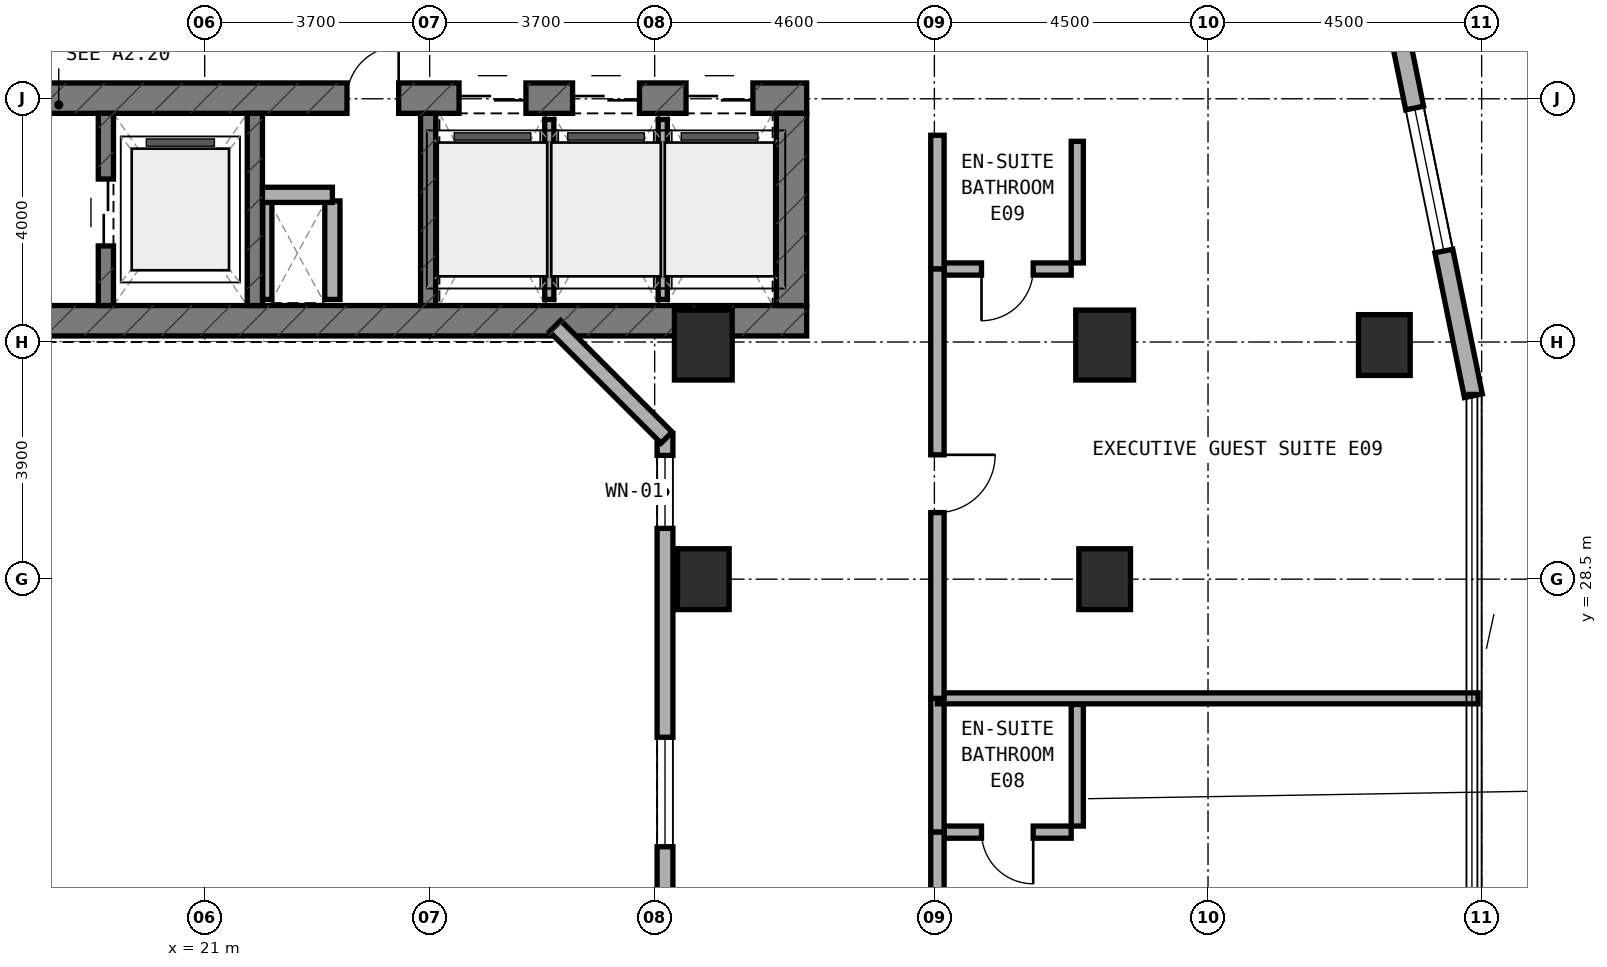
"""IFC4 building model, lengths in metres.
Left out: names, types, materials, properties, quantities, classifications, styles, units other than length and angle.
Written with IfcOpenShell. Run it as: python <this file> out.ifc"""

import sys

from ifc_helpers import new_model, si_unit, direction, frame, frame_2d, origin, origin_2d, place, context, subcontext, project, spatial, rectangle, extrude, element, fill, save


model = new_model("IFC4")
c1 = context("Model", 3, precision=1e-05, world=origin(), true_north=direction((0.0, 1.0)))
c2 = subcontext(c1, "Body", "Model", "MODEL_VIEW")
j1 = project(units=[si_unit("LENGTHUNIT", "METRE"), si_unit("PLANEANGLEUNIT", "RADIAN")], contexts=[c1])
p1 = place(None, origin())
s1 = spatial("IfcSite", under=j1, at=p1, CompositionType="ELEMENT")
p2 = place(p1, origin())
s2 = spatial("IfcBuilding", under=s1, at=p2, CompositionType="ELEMENT")
p3 = place(p2, frame((0.0, 0.0, 83.5)))
s3 = spatial("IfcBuildingStorey", under=s2, at=p3, CompositionType="ELEMENT", Elevation=83.5)
p4 = place(p3, frame((6.3, 32.75, 0.0), z_axis=(0.0, 0.0, 1.0), x_axis=(1.0, 0.0, 0.0)))
e1 = element("IfcWall", 1, at=p4, inside=s3, PredefinedType="SHEAR", context=c2, shape_type="SweptSolid", body=[
    extrude(rectangle(XDim=24.6, YDim=0.5, at=frame_2d((12.3, 0.0))), origin(), (0.0, 0.0, 1.0), 3.5),
])
p5 = place(p4, frame((6.15, 0.0, 0.0)))
e2 = element("IfcOpeningElement", 2, at=p5, cuts=e1, PredefinedType="OPENING", context=c2, shape_type="SweptSolid", body=[
    extrude(rectangle(XDim=1.1, YDim=2.15, at=frame_2d((0.55, 1.075))), frame((0.0, 0.26, 0.0), z_axis=(0.0, -1.0, 0.0), x_axis=(1.0, 0.0, 0.0)), (0.0, 0.0, 1.0), 0.52),
])
p6 = place(p3, frame((6.3, 36.41, 0.0), z_axis=(0.0, 0.0, 1.0), x_axis=(1.0, 0.0, 0.0)))
e3 = element("IfcWall", 3, at=p6, inside=s3, PredefinedType="SHEAR", context=c2, shape_type="SweptSolid", body=[
    extrude(rectangle(XDim=24.6, YDim=0.5, at=frame_2d((12.3, 0.0))), origin(), (0.0, 0.0, 1.0), 3.5),
])
p7 = place(p6, frame((9.25, 0.0, 0.0)))
e4 = element("IfcOpeningElement", 4, at=p7, cuts=e3, PredefinedType="OPENING", context=c2, shape_type="SweptSolid", body=[
    extrude(rectangle(XDim=1.2, YDim=2.15, at=frame_2d((0.6, 1.075))), frame((0.0, 0.26, 0.0), z_axis=(0.0, -1.0, 0.0), x_axis=(1.0, 0.0, 0.0)), (0.0, 0.0, 1.0), 0.52),
])
p8 = place(p6, frame((17.04, 0.0, 0.0)))
e5 = element("IfcOpeningElement", 5, at=p8, cuts=e3, PredefinedType="OPENING", context=c2, shape_type="SweptSolid", body=[
    extrude(rectangle(XDim=0.85, YDim=2.1, at=frame_2d((0.425, 1.05))), frame((0.0, 0.26, 0.0), z_axis=(0.0, -1.0, 0.0), x_axis=(1.0, 0.0, 0.0)), (0.0, 0.0, 1.0), 0.52),
])
p9 = place(p6, frame((18.883, 0.0, 0.0)))
e6 = element("IfcOpeningElement", 6, at=p9, cuts=e3, PredefinedType="OPENING", context=c2, shape_type="SweptSolid", body=[
    extrude(rectangle(XDim=1.1, YDim=2.15, at=frame_2d((0.55, 1.075))), frame((0.0, 0.26, 0.0), z_axis=(0.0, -1.0, 0.0), x_axis=(1.0, 0.0, 0.0)), (0.0, 0.0, 1.0), 0.52),
])
p10 = place(p6, frame((20.75, 0.0, 0.0)))
e7 = element("IfcOpeningElement", 7, at=p10, cuts=e3, PredefinedType="OPENING", context=c2, shape_type="SweptSolid", body=[
    extrude(rectangle(XDim=1.1, YDim=2.15, at=frame_2d((0.55, 1.075))), frame((0.0, 0.26, 0.0), z_axis=(0.0, -1.0, 0.0), x_axis=(1.0, 0.0, 0.0)), (0.0, 0.0, 1.0), 0.52),
])
p11 = place(p6, frame((22.616, 0.0, 0.0)))
e8 = element("IfcOpeningElement", 8, at=p11, cuts=e3, PredefinedType="OPENING", context=c2, shape_type="SweptSolid", body=[
    extrude(rectangle(XDim=1.1, YDim=2.15, at=frame_2d((0.55, 1.075))), frame((0.0, 0.26, 0.0), z_axis=(0.0, -1.0, 0.0), x_axis=(1.0, 0.0, 0.0)), (0.0, 0.0, 1.0), 0.52),
])
p12 = place(p3, frame((30.65, 33.0, 0.0), z_axis=(0.0, 0.0, 1.0), x_axis=(0.0, 1.0, 0.0)))
e9 = element("IfcWall", 9, at=p12, inside=s3, PredefinedType="SHEAR", context=c2, shape_type="SweptSolid", body=[
    extrude(rectangle(XDim=3.16, YDim=0.5, at=frame_2d((1.58, 0.0))), origin(), (0.0, 0.0, 1.0), 3.5),
])
p13 = place(p3, frame((19.375, 33.0, 0.0), z_axis=(0.0, 0.0, 1.0), x_axis=(0.0, 1.0, 0.0)))
e10 = element("IfcWall", 10, at=p13, inside=s3, PredefinedType="STANDARD", context=c2, shape_type="SweptSolid", body=[
    extrude(rectangle(XDim=3.16, YDim=0.25, at=frame_2d((1.58, 0.0))), origin(), (0.0, 0.0, 1.0), 3.22),
])
p14 = place(p13, frame((0.98, 0.0, 0.0)))
e11 = element("IfcOpeningElement", 11, at=p14, cuts=e10, PredefinedType="OPENING", context=c2, shape_type="SweptSolid", body=[
    extrude(rectangle(XDim=1.1, YDim=2.15, at=frame_2d((0.55, 1.075))), frame((0.0, 0.135, 0.0), z_axis=(0.0, -1.0, 0.0), x_axis=(1.0, 0.0, 0.0)), (0.0, 0.0, 1.0), 0.27),
])
for number, where, z_axis, x_axis in (
    (12, (21.825, 33.0, 0.0), (0.0, 0.0, 1.0), (0.0, 1.0, 0.0)),
    (13, (24.675, 33.0, 0.0), (0.0, 0.0, 1.0), (0.0, 1.0, 0.0)),
):
    element("IfcWall", number, at=place(p3, frame(where, z_axis=z_axis, x_axis=x_axis)), inside=s3, PredefinedType="STANDARD", context=c2, shape_type="SweptSolid", body=[
        extrude(rectangle(XDim=3.16, YDim=0.25, at=frame_2d((1.58, 0.0))), origin(), (0.0, 0.0, 1.0), 3.22),
    ])
p15 = place(p3, frame((35.8, 28.5, 0.0), z_axis=(0.0, 0.0, 1.0), x_axis=(1.0, 0.0, 0.0)))
e14 = element("IfcColumn", 14, at=p15, inside=s3, PredefinedType="COLUMN", context=c2, shape_type="SweptSolid", body=[
    extrude(rectangle(XDim=0.85, YDim=1.0, at=origin_2d()), origin(), (0.0, 0.0, 1.0), 3.5),
])
for number, where, z_axis, x_axis in (
    (15, (35.8, 32.35, 0.0), (0.0, 0.0, 1.0), (1.0, 0.0, 0.0)),
    (16, (29.2, 32.35, 0.0), (0.0, 0.0, 1.0), (1.0, 0.0, 0.0)),
):
    element("IfcColumn", number, at=place(p3, frame(where, z_axis=z_axis, x_axis=x_axis)), inside=s3, PredefinedType="COLUMN", context=c2, shape_type="SweptSolid", body=[
        extrude(rectangle(XDim=0.95, YDim=1.15, at=origin_2d()), origin(), (0.0, 0.0, 1.0), 3.5),
    ])
for number, where, z_axis, x_axis in (
    (17, (29.2, 28.5, 0.0), (0.0, 0.0, 1.0), (1.0, 0.0, 0.0)),
    (18, (40.4, 32.35, 0.0), (0.0, 0.0, 1.0), (1.0, 0.0, 0.0)),
):
    element("IfcColumn", number, at=place(p3, frame(where, z_axis=z_axis, x_axis=x_axis)), inside=s3, PredefinedType="COLUMN", context=c2, shape_type="SweptSolid", body=[
        extrude(rectangle(XDim=0.85, YDim=1.0, at=origin_2d()), origin(), (0.0, 0.0, 1.0), 3.5),
    ])
p16 = place(p3, frame((41.864, 31.516, 0.0), z_axis=(0.0, 0.0, 1.0), x_axis=(-0.199990901713, 0.979797754249, 0.0)))
e19 = element("IfcWall", 19, at=p16, inside=s3, PredefinedType="STANDARD", context=c2, shape_type="SweptSolid", body=[
    extrude(rectangle(XDim=10.065, YDim=0.3, at=frame_2d((5.033, 0.0))), origin(), (0.0, 0.0, 1.0), 3.22),
])
p17 = place(p16, frame((2.429, 0.0, 0.8)))
e20 = element("IfcOpeningElement", 20, at=p17, cuts=e19, PredefinedType="OPENING", context=c2, shape_type="SweptSolid", body=[
    extrude(rectangle(XDim=2.4, YDim=1.6, at=frame_2d((1.2, 0.8))), frame((0.0, 0.16, 0.0), z_axis=(0.0, -1.0, 0.0), x_axis=(1.0, 0.0, 0.0)), (0.0, 0.0, 1.0), 0.32),
])
p18 = place(p16, frame((7.887, 0.0, 0.85)))
e21 = element("IfcOpeningElement", 21, at=p18, cuts=e19, PredefinedType="OPENING", context=c2, shape_type="SweptSolid", body=[
    extrude(rectangle(XDim=1.8, YDim=1.5, at=frame_2d((0.9, 0.75))), frame((0.0, 0.16, 0.0), z_axis=(0.0, -1.0, 0.0), x_axis=(1.0, 0.0, 0.0)), (0.0, 0.0, 1.0), 0.32),
])
p19 = place(p3, frame((28.57, 19.11, 0.0), z_axis=(0.0, 0.0, 1.0), x_axis=(0.0, 1.0, 0.0)))
e22 = element("IfcWall", 22, at=p19, inside=s3, PredefinedType="STANDARD", context=c2, shape_type="SweptSolid", body=[
    extrude(rectangle(XDim=11.78, YDim=0.26, at=frame_2d((5.89, 0.0))), origin(), (0.0, 0.0, 1.0), 3.22),
])
p20 = place(p19, frame((0.355, 0.0, 0.85)))
e23 = element("IfcOpeningElement", 23, at=p20, cuts=e22, PredefinedType="OPENING", context=c2, shape_type="SweptSolid", body=[
    extrude(rectangle(XDim=1.2, YDim=1.5, at=frame_2d((0.6, 0.75))), frame((0.0, 0.14, 0.0), z_axis=(0.0, -1.0, 0.0), x_axis=(1.0, 0.0, 0.0)), (0.0, 0.0, 1.0), 0.28),
])
p21 = place(p19, frame((4.99, 0.0, 0.85)))
e24 = element("IfcOpeningElement", 24, at=p21, cuts=e22, PredefinedType="OPENING", context=c2, shape_type="SweptSolid", body=[
    extrude(rectangle(XDim=1.8, YDim=1.5, at=frame_2d((0.9, 0.75))), frame((0.0, 0.14, 0.0), z_axis=(0.0, -1.0, 0.0), x_axis=(1.0, 0.0, 0.0)), (0.0, 0.0, 1.0), 0.28),
])
p22 = place(p19, frame((10.225, 0.0, 0.85)))
e25 = element("IfcOpeningElement", 25, at=p22, cuts=e22, PredefinedType="OPENING", context=c2, shape_type="SweptSolid", body=[
    extrude(rectangle(XDim=1.2, YDim=1.5, at=frame_2d((0.6, 0.75))), frame((0.0, 0.14, 0.0), z_axis=(0.0, -1.0, 0.0), x_axis=(1.0, 0.0, 0.0)), (0.0, 0.0, 1.0), 0.28),
])
p23 = place(p3, frame((28.596, 30.828, 0.0), z_axis=(0.0, 0.0, 1.0), x_axis=(-0.707059717605, 0.707153841636, 0.0)))
e26 = element("IfcWall", 26, at=p23, inside=s3, PredefinedType="STANDARD", context=c2, shape_type="SweptSolid", body=[
    extrude(rectangle(XDim=2.594, YDim=0.26, at=frame_2d((1.297, 0.0))), origin(), (0.0, 0.0, 1.0), 3.22),
])
p24 = place(p3, frame((22.03, 33.1, 0.0), z_axis=(0.0, 0.0, 1.0), x_axis=(0.0, 1.0, 0.0)))
e27 = element("IfcWall", 27, at=p24, inside=s3, PredefinedType="PARTITIONING", context=c2, shape_type="SweptSolid", body=[
    extrude(rectangle(XDim=1.62, YDim=0.15, at=frame_2d((0.81, 0.0))), origin(), (0.0, 0.0, 1.0), 3.22),
])
p25 = place(p3, frame((23.1, 33.1, 0.0), z_axis=(0.0, 0.0, 1.0), x_axis=(0.0, 1.0, 0.0)))
e28 = element("IfcWall", 28, at=p25, inside=s3, PredefinedType="SOLIDWALL", context=c2, shape_type="SweptSolid", body=[
    extrude(rectangle(XDim=1.62, YDim=0.25, at=frame_2d((0.81, 0.0))), origin(), (0.0, 0.0, 1.0), 3.22),
])
p26 = place(p3, frame((21.95, 34.82, 0.0), z_axis=(0.0, 0.0, 1.0), x_axis=(1.0, 0.0, 0.0)))
e29 = element("IfcWall", 29, at=p26, inside=s3, PredefinedType="SOLIDWALL", context=c2, shape_type="SweptSolid", body=[
    extrude(rectangle(XDim=1.15, YDim=0.25, at=frame_2d((0.575, 0.0))), origin(), (0.0, 0.0, 1.0), 3.22),
])
p27 = place(p3, frame((26.667, 33.1, 0.0), z_axis=(0.0, 0.0, 1.0), x_axis=(0.0, 1.0, 0.0)))
e30 = element("IfcWall", 30, at=p27, inside=s3, PredefinedType="PARTITIONING", context=c2, shape_type="SweptSolid", body=[
    extrude(rectangle(XDim=2.96, YDim=0.15, at=frame_2d((1.48, 0.0))), origin(), (0.0, 0.0, 1.0), 3.22),
])
p28 = place(p3, frame((28.533, 33.1, 0.0), z_axis=(0.0, 0.0, 1.0), x_axis=(0.0, 1.0, 0.0)))
e31 = element("IfcWall", 31, at=p28, inside=s3, PredefinedType="PARTITIONING", context=c2, shape_type="SweptSolid", body=[
    extrude(rectangle(XDim=2.96, YDim=0.15, at=frame_2d((1.48, 0.0))), origin(), (0.0, 0.0, 1.0), 2.595),
])
p29 = place(p3, frame((33.15, 24.34, 0.0), z_axis=(0.0, 0.0, 1.0), x_axis=(1.0, 0.0, 0.0)))
e32 = element("IfcWall", 32, at=p29, inside=s3, PredefinedType="PLUMBINGWALL", context=c2, shape_type="SweptSolid", body=[
    extrude(rectangle(XDim=2.1, YDim=0.2, at=frame_2d((1.05, 0.0))), origin(), (0.0, 0.0, 1.0), 3.22),
])
p30 = place(p29, frame((0.625, 0.0, 0.0)))
e33 = element("IfcOpeningElement", 33, at=p30, cuts=e32, PredefinedType="OPENING", context=c2, shape_type="SweptSolid", body=[
    extrude(rectangle(XDim=0.85, YDim=2.1, at=frame_2d((0.425, 1.05))), frame((0.0, 0.11, 0.0), z_axis=(0.0, -1.0, 0.0), x_axis=(1.0, 0.0, 0.0)), (0.0, 0.0, 1.0), 0.22),
])
p31 = place(p3, frame((35.35, 24.44, 0.0), z_axis=(0.0, 0.0, 1.0), x_axis=(0.0, 1.0, 0.0)))
e34 = element("IfcWall", 34, at=p31, inside=s3, PredefinedType="PLUMBINGWALL", context=c2, shape_type="SweptSolid", body=[
    extrude(rectangle(XDim=2.0, YDim=0.2, at=frame_2d((1.0, 0.0))), origin(), (0.0, 0.0, 1.0), 3.22),
])
p32 = place(p3, frame((33.05, 24.34, 0.0), z_axis=(0.0, 0.0, 1.0), x_axis=(0.0, 1.0, 0.0)))
e35 = element("IfcWall", 35, at=p32, inside=s3, PredefinedType="SOLIDWALL", context=c2, shape_type="SweptSolid", body=[
    extrude(rectangle(XDim=2.2, YDim=0.22, at=frame_2d((1.1, 0.0))), origin(), (0.0, 0.0, 1.0), 3.22),
])
p33 = place(p3, frame((33.05, 14.2, 0.0), z_axis=(0.0, 0.0, 1.0), x_axis=(0.0, 1.0, 0.0)))
e36 = element("IfcWall", 36, at=p33, inside=s3, PredefinedType="SOLIDWALL", context=c2, shape_type="SweptSolid", body=[
    extrude(rectangle(XDim=10.14, YDim=0.22, at=frame_2d((5.07, 0.0))), origin(), (0.0, 0.0, 1.0), 2.595),
])
p34 = place(p33, frame((4.595, 0.0, 0.0)))
e37 = element("IfcOpeningElement", 37, at=p34, cuts=e36, PredefinedType="OPENING", context=c2, shape_type="SweptSolid", body=[
    extrude(rectangle(XDim=0.95, YDim=2.1, at=frame_2d((0.475, 1.05))), frame((0.0, 0.12, 0.0), z_axis=(0.0, -1.0, 0.0), x_axis=(1.0, 0.0, 0.0)), (0.0, 0.0, 1.0), 0.24),
])
p35 = place(p3, frame((33.05, 26.54, 0.0), z_axis=(0.0, 0.0, 1.0), x_axis=(1.0, 0.0, 0.0)))
e38 = element("IfcWall", 38, at=p35, inside=s3, PredefinedType="SOLIDWALL", context=c2, shape_type="SweptSolid", body=[
    extrude(rectangle(XDim=8.89, YDim=0.18, at=frame_2d((4.445, 0.0))), origin(), (0.0, 0.0, 1.0), 2.745),
])
p36 = place(p3, frame((33.15, 33.6, 0.0), z_axis=(0.0, 0.0, 1.0), x_axis=(1.0, 0.0, 0.0)))
e39 = element("IfcWall", 39, at=p36, inside=s3, PredefinedType="PLUMBINGWALL", context=c2, shape_type="SweptSolid", body=[
    extrude(rectangle(XDim=2.1, YDim=0.2, at=frame_2d((1.05, 0.0))), origin(), (0.0, 0.0, 1.0), 3.22),
])
p37 = place(p36, frame((0.625, 0.0, 0.0)))
e40 = element("IfcOpeningElement", 40, at=p37, cuts=e39, PredefinedType="OPENING", context=c2, shape_type="SweptSolid", body=[
    extrude(rectangle(XDim=0.85, YDim=2.1, at=frame_2d((0.425, 1.05))), frame((0.0, 0.11, 0.0), z_axis=(0.0, -1.0, 0.0), x_axis=(1.0, 0.0, 0.0)), (0.0, 0.0, 1.0), 0.22),
])
p38 = place(p3, frame((35.35, 33.7, 0.0), z_axis=(0.0, 0.0, 1.0), x_axis=(0.0, 1.0, 0.0)))
e41 = element("IfcWall", 41, at=p38, inside=s3, PredefinedType="PLUMBINGWALL", context=c2, shape_type="SweptSolid", body=[
    extrude(rectangle(XDim=2.0, YDim=0.2, at=frame_2d((1.0, 0.0))), origin(), (0.0, 0.0, 1.0), 2.745),
])
p39 = place(p3, frame((33.05, 33.6, 0.0), z_axis=(0.0, 0.0, 1.0), x_axis=(0.0, 1.0, 0.0)))
e42 = element("IfcWall", 42, at=p39, inside=s3, PredefinedType="SOLIDWALL", context=c2, shape_type="SweptSolid", body=[
    extrude(rectangle(XDim=2.2, YDim=0.22, at=frame_2d((1.1, 0.0))), origin(), (0.0, 0.0, 1.0), 3.22),
])
p40 = place(p3, frame((33.05, 26.54, 0.0), z_axis=(0.0, 0.0, 1.0), x_axis=(0.0, 1.0, 0.0)))
e43 = element("IfcWall", 43, at=p40, inside=s3, PredefinedType="SOLIDWALL", context=c2, shape_type="SweptSolid", body=[
    extrude(rectangle(XDim=7.06, YDim=0.22, at=frame_2d((3.53, 0.0))), origin(), (0.0, 0.0, 1.0), 2.595),
])
p41 = place(p40, frame((3.055, 0.0, 0.0)))
e44 = element("IfcOpeningElement", 44, at=p41, cuts=e43, PredefinedType="OPENING", context=c2, shape_type="SweptSolid", body=[
    extrude(rectangle(XDim=0.95, YDim=2.1, at=frame_2d((0.475, 1.05))), frame((0.0, 0.12, 0.0), z_axis=(0.0, -1.0, 0.0), x_axis=(1.0, 0.0, 0.0)), (0.0, 0.0, 1.0), 0.24),
])
p42 = place(p17, origin())
e45 = element("IfcWindow", 45, at=p42, inside=s3, PartitioningType="SINGLE_PANEL", PredefinedType="WINDOW", context=c2, shape_type="SweptSolid", body=[
    extrude(rectangle(XDim=2.4, YDim=1.6, at=frame_2d((1.2, 0.8))), frame((0.0, 0.03, 0.0), z_axis=(0.0, -1.0, 0.0), x_axis=(1.0, 0.0, 0.0)), (0.0, 0.0, 1.0), 0.06),
])
fill(e20, e45)
p43 = place(p21, origin())
e46 = element("IfcWindow", 46, at=p43, inside=s3, PartitioningType="SINGLE_PANEL", PredefinedType="WINDOW", context=c2, shape_type="SweptSolid", body=[
    extrude(rectangle(XDim=1.8, YDim=1.5, at=frame_2d((0.9, 0.75))), frame((0.0, 0.03, 0.0), z_axis=(0.0, -1.0, 0.0), x_axis=(1.0, 0.0, 0.0)), (0.0, 0.0, 1.0), 0.06),
])
fill(e24, e46)
p44 = place(p22, origin())
e47 = element("IfcWindow", 47, at=p44, inside=s3, PartitioningType="SINGLE_PANEL", PredefinedType="WINDOW", context=c2, shape_type="SweptSolid", body=[
    extrude(rectangle(XDim=1.2, YDim=1.5, at=frame_2d((0.6, 0.75))), frame((0.0, 0.03, 0.0), z_axis=(0.0, -1.0, 0.0), x_axis=(1.0, 0.0, 0.0)), (0.0, 0.0, 1.0), 0.06),
])
fill(e25, e47)
p45 = place(p14, origin())
e48 = element("IfcDoor", 48, at=p45, inside=s3, OperationType="DOUBLE_DOOR_SLIDING", PredefinedType="DOOR", context=c2, shape_type="SweptSolid", body=[
    extrude(rectangle(XDim=1.1, YDim=2.15, at=frame_2d((0.55, 1.075))), frame((0.0, 0.025, 0.0), z_axis=(0.0, -1.0, 0.0), x_axis=(1.0, 0.0, 0.0)), (0.0, 0.0, 1.0), 0.05),
])
fill(e11, e48)
p46 = place(p8, origin())
e49 = element("IfcDoor", 49, at=p46, inside=s3, OperationType="SINGLE_SWING_RIGHT", PredefinedType="DOOR", context=c2, shape_type="SweptSolid", body=[
    extrude(rectangle(XDim=0.85, YDim=2.1, at=frame_2d((0.425, 1.05))), frame((0.0, 0.025, 0.0), z_axis=(0.0, -1.0, 0.0), x_axis=(1.0, 0.0, 0.0)), (0.0, 0.0, 1.0), 0.05),
])
fill(e5, e49)
p47 = place(p9, origin())
e50 = element("IfcDoor", 50, at=p47, inside=s3, OperationType="DOUBLE_DOOR_SLIDING", PredefinedType="DOOR", context=c2, shape_type="SweptSolid", body=[
    extrude(rectangle(XDim=1.1, YDim=2.15, at=frame_2d((0.55, 1.075))), frame((0.0, 0.025, 0.0), z_axis=(0.0, -1.0, 0.0), x_axis=(1.0, 0.0, 0.0)), (0.0, 0.0, 1.0), 0.05),
])
fill(e6, e50)
p48 = place(p10, origin())
e51 = element("IfcDoor", 51, at=p48, inside=s3, OperationType="DOUBLE_DOOR_SLIDING", PredefinedType="DOOR", context=c2, shape_type="SweptSolid", body=[
    extrude(rectangle(XDim=1.1, YDim=2.15, at=frame_2d((0.55, 1.075))), frame((0.0, 0.025, 0.0), z_axis=(0.0, -1.0, 0.0), x_axis=(1.0, 0.0, 0.0)), (0.0, 0.0, 1.0), 0.05),
])
fill(e7, e51)
p49 = place(p11, origin())
e52 = element("IfcDoor", 52, at=p49, inside=s3, OperationType="DOUBLE_DOOR_SLIDING", PredefinedType="DOOR", context=c2, shape_type="SweptSolid", body=[
    extrude(rectangle(XDim=1.1, YDim=2.15, at=frame_2d((0.55, 1.075))), frame((0.0, 0.025, 0.0), z_axis=(0.0, -1.0, 0.0), x_axis=(1.0, 0.0, 0.0)), (0.0, 0.0, 1.0), 0.05),
])
fill(e8, e52)
p50 = place(p30, frame((0.85, 0.0, 0.0), z_axis=(0.0, 0.0, 1.0), x_axis=(-1.0, 0.0, 0.0)))
e53 = element("IfcDoor", 53, at=p50, inside=s3, OperationType="SINGLE_SWING_LEFT", PredefinedType="DOOR", context=c2, shape_type="SweptSolid", body=[
    extrude(rectangle(XDim=0.85, YDim=2.1, at=frame_2d((0.425, 1.05))), frame((0.0, 0.025, 0.0), z_axis=(0.0, -1.0, 0.0), x_axis=(1.0, 0.0, 0.0)), (0.0, 0.0, 1.0), 0.05),
])
fill(e33, e53)
p51 = place(p37, frame((0.85, 0.0, 0.0), z_axis=(0.0, 0.0, 1.0), x_axis=(-1.0, 0.0, 0.0)))
e54 = element("IfcDoor", 54, at=p51, inside=s3, OperationType="SINGLE_SWING_RIGHT", PredefinedType="DOOR", context=c2, shape_type="SweptSolid", body=[
    extrude(rectangle(XDim=0.85, YDim=2.1, at=frame_2d((0.425, 1.05))), frame((0.0, 0.025, 0.0), z_axis=(0.0, -1.0, 0.0), x_axis=(1.0, 0.0, 0.0)), (0.0, 0.0, 1.0), 0.05),
])
fill(e40, e54)
p52 = place(p41, frame((0.95, 0.0, 0.0), z_axis=(0.0, 0.0, 1.0), x_axis=(-1.0, 0.0, 0.0)))
e55 = element("IfcDoor", 55, at=p52, inside=s3, OperationType="SINGLE_SWING_LEFT", PredefinedType="DOOR", context=c2, shape_type="SweptSolid", body=[
    extrude(rectangle(XDim=0.95, YDim=2.1, at=frame_2d((0.475, 1.05))), frame((0.0, 0.025, 0.0), z_axis=(0.0, -1.0, 0.0), x_axis=(1.0, 0.0, 0.0)), (0.0, 0.0, 1.0), 0.05),
])
fill(e44, e55)
save(model, sys.argv[1])
